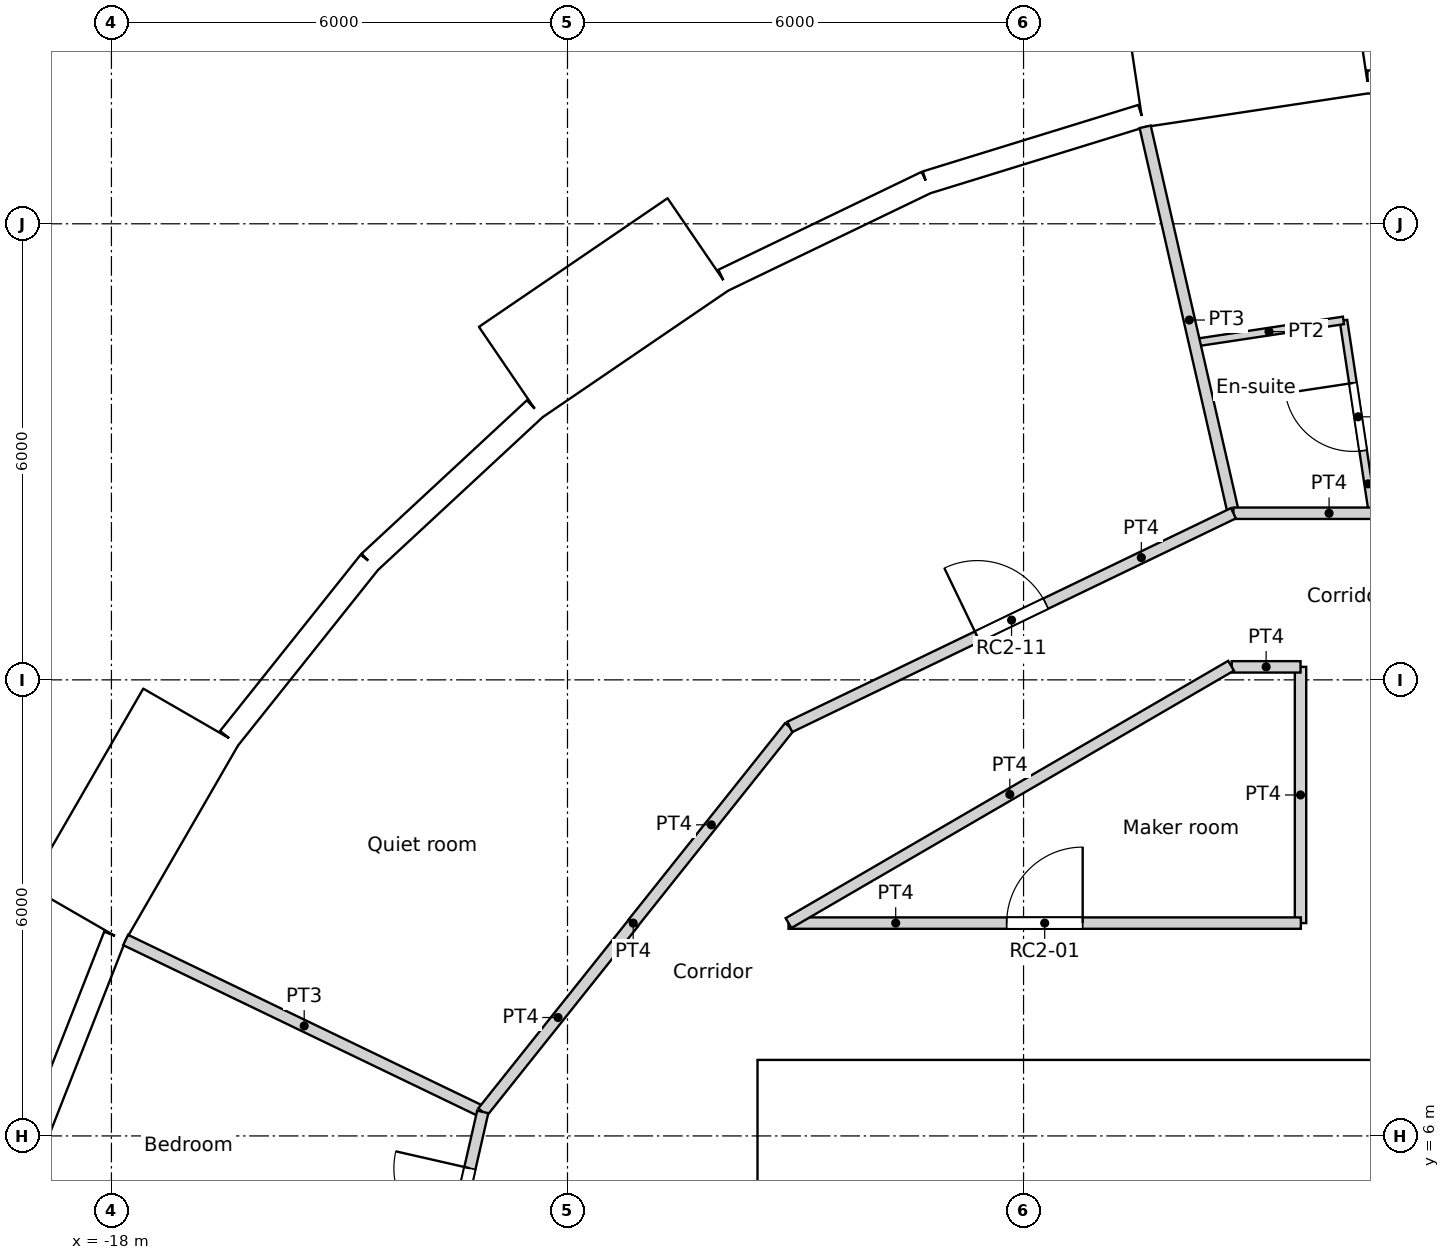
"""IFC4 building model, lengths in metres.
Left out: names, types, materials, properties, quantities, classifications, styles, units other than length and angle.
Written with IfcOpenShell. Run it as: python <this file> out.ifc"""

import sys

from ifc_helpers import new_model, si_unit, direction, frame, frame_2d, origin, origin_2d, place, context, subcontext, project, spatial, rectangle, circle, extrude, element, fill, save


model = new_model("IFC4")
c1 = context("Model", 3, precision=1e-05, world=origin(), true_north=direction((0.0, 1.0)))
c2 = subcontext(c1, "Body", "Model", "MODEL_VIEW")
j1 = project(units=[si_unit("LENGTHUNIT", "METRE"), si_unit("PLANEANGLEUNIT", "RADIAN")], contexts=[c1])
p1 = place(None, origin())
s1 = spatial("IfcSite", under=j1, at=p1, CompositionType="ELEMENT")
p2 = place(p1, origin())
s2 = spatial("IfcBuilding", under=s1, at=p2, CompositionType="ELEMENT")
p3 = place(p2, frame((0.0, 0.0, 241.8)))
s3 = spatial("IfcBuildingStorey", under=s2, at=p3, CompositionType="ELEMENT", Elevation=241.8)
for number, where, z_axis, x_axis in (
    (1, (-4.188, 18.35, 0.0), (0.0, 0.0, 1.0), (1.0, 0.0, 0.0)),
    (2, (-9.411, 16.301, 0.0), (0.0, 0.0, 1.0), (1.0, 0.0, 0.0)),
    (3, (-13.798, 12.802, 0.0), (0.0, 0.0, 1.0), (1.0, 0.0, 0.0)),
    (4, (-16.958, 8.167, 0.0), (0.0, 0.0, 1.0), (1.0, 0.0, 0.0)),
):
    element("IfcColumn", number, at=place(p3, frame(where, z_axis=z_axis, x_axis=x_axis)), inside=s3, PredefinedType="COLUMN", context=c2, shape_type="SweptSolid", body=[
        extrude(circle(Radius=0.55, at=origin_2d()), origin(), (0.0, 0.0, 1.0), 3.6),
    ])
p4 = place(p3, frame((1.489, 19.866, 0.0), z_axis=(0.0, 0.0, 1.0), x_axis=(-1.0, 0.0, 0.0)))
e5 = element("IfcWall", 5, at=p4, inside=s3, PredefinedType="SOLIDWALL", context=c2, shape_type="SweptSolid", body=[
    extrude(rectangle(XDim=2.962, YDim=0.3, at=frame_2d((1.481, 0.0))), origin(), (0.0, 0.0, 1.0), 3.25),
])
p5 = place(p4, frame((1.481, 0.0, 1.55)))
e6 = element("IfcOpeningElement", 6, at=p5, cuts=e5, PredefinedType="OPENING", context=c2, shape_type="SweptSolid", body=[
    extrude(circle(Radius=0.9, at=origin_2d()), frame((0.0, 0.16, 0.0), z_axis=(0.0, -1.0, 0.0), x_axis=(1.0, 0.0, 0.0)), (0.0, 0.0, 1.0), 0.32),
])
p6 = place(p3, frame((-1.563, 20.436, -0.35), z_axis=(0.0, 0.0, 1.0), x_axis=(-0.988836445254, -0.149004981587, 0.0)))
e7 = element("IfcWall", 7, at=p6, inside=s3, PredefinedType="ELEMENTEDWALL", context=c2, shape_type="SweptSolid", body=[
    extrude(rectangle(XDim=3.0, YDim=1.45, at=frame_2d((1.5, 0.0))), origin(), (0.0, 0.0, 1.0), 3.6),
])
p7 = place(p6, frame((1.5, 0.0, 1.9)))
e8 = element("IfcOpeningElement", 8, at=p7, cuts=e7, PredefinedType="OPENING", context=c2, shape_type="SweptSolid", body=[
    extrude(circle(Radius=0.9, at=origin_2d()), frame((0.0, 0.735, 0.0), z_axis=(0.0, -1.0, 0.0), x_axis=(1.0, 0.0, 0.0)), (0.0, 0.0, 1.0), 1.47),
])
p8 = place(p3, frame((-4.448, 19.418, 0.0), z_axis=(0.0, 0.0, 1.0), x_axis=(-0.95558635705, -0.294711238707, 0.0)))
e9 = element("IfcWall", 9, at=p8, inside=s3, PredefinedType="SOLIDWALL", context=c2, shape_type="SweptSolid", body=[
    extrude(rectangle(XDim=2.962, YDim=0.3, at=frame_2d((1.481, 0.0))), origin(), (0.0, 0.0, 1.0), 3.25),
])
p9 = place(p8, frame((1.481, 0.0, 1.55)))
e10 = element("IfcOpeningElement", 10, at=p9, cuts=e9, PredefinedType="OPENING", context=c2, shape_type="SweptSolid", body=[
    extrude(circle(Radius=0.9, at=origin_2d()), frame((0.0, 0.16, 0.0), z_axis=(0.0, -1.0, 0.0), x_axis=(1.0, 0.0, 0.0)), (0.0, 0.0, 1.0), 0.32),
])
p10 = place(p3, frame((-7.278, 18.545, 0.0), z_axis=(0.0, 0.0, 1.0), x_axis=(-0.900939615635, -0.433944476838, 0.0)))
e11 = element("IfcWall", 11, at=p10, inside=s3, PredefinedType="SOLIDWALL", context=c2, shape_type="SweptSolid", body=[
    extrude(rectangle(XDim=2.962, YDim=0.3, at=frame_2d((1.481, 0.0))), origin(), (0.0, 0.0, 1.0), 3.25),
])
p11 = place(p10, frame((1.481, 0.0, 1.55)))
e12 = element("IfcOpeningElement", 12, at=p11, cuts=e11, PredefinedType="OPENING", context=c2, shape_type="SweptSolid", body=[
    extrude(circle(Radius=0.9, at=origin_2d()), frame((0.0, 0.16, 0.0), z_axis=(0.0, -1.0, 0.0), x_axis=(1.0, 0.0, 0.0)), (0.0, 0.0, 1.0), 0.32),
])
p12 = place(p3, frame((-10.275, 17.734, -0.35), z_axis=(0.0, 0.0, 1.0), x_axis=(-0.826246281157, -0.563309047392, 0.0)))
e13 = element("IfcWall", 13, at=p12, inside=s3, PredefinedType="ELEMENTEDWALL", context=c2, shape_type="SweptSolid", body=[
    extrude(rectangle(XDim=3.0, YDim=1.45, at=frame_2d((1.5, 0.0))), origin(), (0.0, 0.0, 1.0), 3.6),
])
p13 = place(p12, frame((1.5, 0.0, 1.9)))
e14 = element("IfcOpeningElement", 14, at=p13, cuts=e13, PredefinedType="OPENING", context=c2, shape_type="SweptSolid", body=[
    extrude(circle(Radius=0.9, at=origin_2d()), frame((0.0, 0.735, 0.0), z_axis=(0.0, -1.0, 0.0), x_axis=(1.0, 0.0, 0.0)), (0.0, 0.0, 1.0), 1.47),
])
p14 = place(p3, frame((-12.432, 15.565, 0.0), z_axis=(0.0, 0.0, 1.0), x_axis=(-0.733066412643, -0.680157066165, 0.0)))
e15 = element("IfcWall", 15, at=p14, inside=s3, PredefinedType="SOLIDWALL", context=c2, shape_type="SweptSolid", body=[
    extrude(rectangle(XDim=2.962, YDim=0.3, at=frame_2d((1.481, 0.0))), origin(), (0.0, 0.0, 1.0), 3.25),
])
p15 = place(p14, frame((1.481, 0.0, 1.55)))
e16 = element("IfcOpeningElement", 16, at=p15, cuts=e15, PredefinedType="OPENING", context=c2, shape_type="SweptSolid", body=[
    extrude(circle(Radius=0.9, at=origin_2d()), frame((0.0, 0.16, 0.0), z_axis=(0.0, -1.0, 0.0), x_axis=(1.0, 0.0, 0.0)), (0.0, 0.0, 1.0), 0.32),
])
p16 = place(p3, frame((-14.604, 13.55, 0.0), z_axis=(0.0, 0.0, 1.0), x_axis=(-0.623498236992, -0.781824755599, 0.0)))
e17 = element("IfcWall", 17, at=p16, inside=s3, PredefinedType="SOLIDWALL", context=c2, shape_type="SweptSolid", body=[
    extrude(rectangle(XDim=2.962, YDim=0.3, at=frame_2d((1.481, 0.0))), origin(), (0.0, 0.0, 1.0), 3.25),
])
p17 = place(p16, frame((1.481, 0.0, 1.55)))
e18 = element("IfcOpeningElement", 18, at=p17, cuts=e17, PredefinedType="OPENING", context=c2, shape_type="SweptSolid", body=[
    extrude(circle(Radius=0.9, at=origin_2d()), frame((0.0, 0.16, 0.0), z_axis=(0.0, -1.0, 0.0), x_axis=(1.0, 0.0, 0.0)), (0.0, 0.0, 1.0), 0.32),
])
p18 = place(p3, frame((-16.952, 11.52, -0.35), z_axis=(0.0, 0.0, 1.0), x_axis=(-0.499990139034, -0.866031096941, 0.0)))
e19 = element("IfcWall", 19, at=p18, inside=s3, PredefinedType="ELEMENTEDWALL", context=c2, shape_type="SweptSolid", body=[
    extrude(rectangle(XDim=3.0, YDim=1.45, at=frame_2d((1.5, 0.0))), origin(), (0.0, 0.0, 1.0), 3.6),
])
p19 = place(p18, frame((1.5, 0.0, 1.9)))
e20 = element("IfcOpeningElement", 20, at=p19, cuts=e19, PredefinedType="OPENING", context=c2, shape_type="SweptSolid", body=[
    extrude(circle(Radius=0.9, at=origin_2d()), frame((0.0, 0.735, 0.0), z_axis=(0.0, -1.0, 0.0), x_axis=(1.0, 0.0, 0.0)), (0.0, 0.0, 1.0), 1.47),
])
p20 = place(p3, frame((-17.955, 8.629, 0.0), z_axis=(0.0, 0.0, 1.0), x_axis=(-0.36530043032, -0.930889679612, 0.0)))
e21 = element("IfcWall", 21, at=p20, inside=s3, PredefinedType="SOLIDWALL", context=c2, shape_type="SweptSolid", body=[
    extrude(rectangle(XDim=2.962, YDim=0.3, at=frame_2d((1.481, 0.0))), origin(), (0.0, 0.0, 1.0), 3.25),
])
p21 = place(p20, frame((1.481, 0.0, 1.55)))
e22 = element("IfcOpeningElement", 22, at=p21, cuts=e21, PredefinedType="OPENING", context=c2, shape_type="SweptSolid", body=[
    extrude(circle(Radius=0.9, at=origin_2d()), frame((0.0, 0.16, 0.0), z_axis=(0.0, -1.0, 0.0), x_axis=(1.0, 0.0, 0.0)), (0.0, 0.0, 1.0), 0.32),
])
p22 = place(p3, frame((-9.5, 6.7, 0.0), z_axis=(0.0, 0.0, 1.0), x_axis=(1.0, 0.0, 0.0)))
e23 = element("IfcWall", 23, at=p22, inside=s3, PredefinedType="SOLIDWALL", context=c2, shape_type="SweptSolid", body=[
    extrude(rectangle(XDim=19.0, YDim=0.6, at=frame_2d((9.5, 0.0))), origin(), (0.0, 0.0, 1.0), 3.6),
])
p23 = place(p22, frame((5.35, 0.0, 0.0)))
e24 = element("IfcOpeningElement", 24, at=p23, cuts=e23, PredefinedType="OPENING", context=c2, shape_type="SweptSolid", body=[
    extrude(rectangle(XDim=1.7, YDim=2.1, at=frame_2d((0.85, 1.05))), frame((0.0, 0.3, 0.0), z_axis=(0.0, -1.0, 0.0), x_axis=(1.0, 0.0, 0.0)), (0.0, 0.0, 1.0), 0.6),
])
p24 = place(p3, frame((-9.2, -6.4, 0.0), z_axis=(0.0, 0.0, 1.0), x_axis=(0.0, 1.0, 0.0)))
e25 = element("IfcWall", 25, at=p24, inside=s3, PredefinedType="SOLIDWALL", context=c2, shape_type="SweptSolid", body=[
    extrude(rectangle(XDim=12.8, YDim=0.6, at=frame_2d((6.4, 0.0))), origin(), (0.0, 0.0, 1.0), 3.6),
])
p25 = place(p3, frame((-2.25, 3.25, 0.0), z_axis=(0.0, 0.0, 1.0), x_axis=(0.0, 1.0, 0.0)))
e26 = element("IfcWall", 26, at=p25, inside=s3, PredefinedType="SOLIDWALL", context=c2, shape_type="SweptSolid", body=[
    extrude(rectangle(XDim=3.15, YDim=0.3, at=frame_2d((1.575, 0.0))), origin(), (0.0, 0.0, 1.0), 3.25),
])
p26 = place(p3, frame((-9.092, 8.8, 0.0), z_axis=(0.0, 0.0, 1.0), x_axis=(0.864470922103, 0.502682827277, 0.0)))
e27 = element("IfcWall", 27, at=p26, inside=s3, PredefinedType="PARTITIONING", context=c2, shape_type="SweptSolid", body=[
    extrude(rectangle(XDim=6.735, YDim=0.15, at=frame_2d((3.368, 0.0))), origin(), (0.0, 0.0, 1.0), 3.25),
])
p27 = place(p3, frame((-9.092, 8.8, 0.0), z_axis=(0.0, 0.0, 1.0), x_axis=(1.0, 0.0, 0.0)))
e28 = element("IfcWall", 28, at=p27, inside=s3, PredefinedType="PARTITIONING", context=c2, shape_type="SweptSolid", body=[
    extrude(rectangle(XDim=6.74, YDim=0.15, at=frame_2d((3.37, 0.0))), origin(), (0.0, 0.0, 1.0), 3.25),
])
p28 = place(p27, frame((2.87, 0.0, 0.0)))
e29 = element("IfcOpeningElement", 29, at=p28, cuts=e28, PredefinedType="OPENING", context=c2, shape_type="SweptSolid", body=[
    extrude(rectangle(XDim=1.0, YDim=2.04, at=frame_2d((0.5, 1.02))), frame((0.0, 0.075, 0.0), z_axis=(0.0, -1.0, 0.0), x_axis=(1.0, 0.0, 0.0)), (0.0, 0.0, 1.0), 0.15),
])
p29 = place(p3, frame((-11.134, 8.8, 0.0), z_axis=(0.0, 0.0, 1.0), x_axis=(-1.0, 0.0, 0.0)))
e30 = element("IfcWall", 30, at=p29, inside=s3, PredefinedType="PARTITIONING", context=c2, shape_type="SweptSolid", body=[
    extrude(rectangle(XDim=0.003, YDim=0.15, at=frame_2d((0.001, 0.0))), origin(), (0.0, 0.0, 1.0), 3.25),
])
p30 = place(p3, frame((-11.136, 8.802, 0.0), z_axis=(0.0, 0.0, 1.0), x_axis=(0.623151397235, 0.782101231379, 0.0)))
e31 = element("IfcWall", 31, at=p30, inside=s3, PredefinedType="PARTITIONING", context=c2, shape_type="SweptSolid", body=[
    extrude(rectangle(XDim=3.301, YDim=0.15, at=frame_2d((1.65, 0.0))), origin(), (0.0, 0.0, 1.0), 3.25),
])
p31 = place(p3, frame((-2.356, 8.8, 0.0), z_axis=(0.0, 0.0, 1.0), x_axis=(0.0, 1.0, 0.0)))
e32 = element("IfcWall", 32, at=p31, inside=s3, PredefinedType="PARTITIONING", context=c2, shape_type="SweptSolid", body=[
    extrude(rectangle(XDim=3.371, YDim=0.15, at=frame_2d((1.686, 0.0))), origin(), (0.0, 0.0, 1.0), 3.25),
])
p32 = place(p3, frame((-3.261, 12.171, 0.0), z_axis=(0.0, 0.0, 1.0), x_axis=(1.0, 0.0, 0.0)))
e33 = element("IfcWall", 33, at=p32, inside=s3, PredefinedType="PARTITIONING", context=c2, shape_type="SweptSolid", body=[
    extrude(rectangle(XDim=0.905, YDim=0.15, at=frame_2d((0.453, 0.0))), origin(), (0.0, 0.0, 1.0), 3.25),
])
p33 = place(p3, frame((-3.239, 14.192, 0.0), z_axis=(0.0, 0.0, 1.0), x_axis=(1.0, 0.0, 0.0)))
e34 = element("IfcWall", 34, at=p33, inside=s3, PredefinedType="PARTITIONING", context=c2, shape_type="SweptSolid", body=[
    extrude(rectangle(XDim=6.478, YDim=0.15, at=frame_2d((3.239, 0.0))), origin(), (0.0, 0.0, 1.0), 3.25),
])
p34 = place(p33, frame((4.888, 0.0, 0.0)))
e35 = element("IfcOpeningElement", 35, at=p34, cuts=e34, PredefinedType="OPENING", context=c2, shape_type="SweptSolid", body=[
    extrude(rectangle(XDim=1.0, YDim=2.1, at=frame_2d((0.5, 1.05))), frame((0.0, 0.075, 0.0), z_axis=(0.0, -1.0, 0.0), x_axis=(1.0, 0.0, 0.0)), (0.0, 0.0, 1.0), 0.15),
])
p35 = place(p33, frame((2.567, 0.0, 0.0)))
e36 = element("IfcOpeningElement", 36, at=p35, cuts=e34, PredefinedType="OPENING", context=c2, shape_type="SweptSolid", body=[
    extrude(rectangle(XDim=1.0, YDim=2.1, at=frame_2d((0.5, 1.05))), frame((0.0, 0.075, 0.0), z_axis=(0.0, -1.0, 0.0), x_axis=(1.0, 0.0, 0.0)), (0.0, 0.0, 1.0), 0.15),
])
p36 = place(p3, frame((-9.076, 11.381, 0.0), z_axis=(0.0, 0.0, 1.0), x_axis=(0.900976027191, 0.433868872388, 0.0)))
e37 = element("IfcWall", 37, at=p36, inside=s3, PredefinedType="PARTITIONING", context=c2, shape_type="SweptSolid", body=[
    extrude(rectangle(XDim=6.479, YDim=0.15, at=frame_2d((3.239, 0.0))), origin(), (0.0, 0.0, 1.0), 3.25),
])
p37 = place(p36, frame((2.739, 0.0, 0.0)))
e38 = element("IfcOpeningElement", 38, at=p37, cuts=e37, PredefinedType="OPENING", context=c2, shape_type="SweptSolid", body=[
    extrude(rectangle(XDim=1.0, YDim=2.04, at=frame_2d((0.5, 1.02))), frame((0.0, 0.075, 0.0), z_axis=(0.0, -1.0, 0.0), x_axis=(1.0, 0.0, 0.0)), (0.0, 0.0, 1.0), 0.15),
])
p38 = place(p3, frame((-13.115, 6.316, 0.0), z_axis=(0.0, 0.0, 1.0), x_axis=(0.623476099415, 0.781842409606, 0.0)))
e39 = element("IfcWall", 39, at=p38, inside=s3, PredefinedType="PARTITIONING", context=c2, shape_type="SweptSolid", body=[
    extrude(rectangle(XDim=3.177, YDim=0.15, at=frame_2d((1.589, 0.0))), origin(), (0.0, 0.0, 1.0), 3.25),
])
p39 = place(p3, frame((-14.557, 0.0, 0.0), z_axis=(0.0, 0.0, 1.0), x_axis=(0.222533159771, 0.974925121639, 0.0)))
e40 = element("IfcWall", 40, at=p39, inside=s3, PredefinedType="PARTITIONING", context=c2, shape_type="SweptSolid", body=[
    extrude(rectangle(XDim=6.478, YDim=0.15, at=frame_2d((3.239, 0.0))), origin(), (0.0, 0.0, 1.0), 3.25),
])
p40 = place(p39, frame((4.718, 0.0, 0.0)))
e41 = element("IfcOpeningElement", 41, at=p40, cuts=e40, PredefinedType="OPENING", context=c2, shape_type="SweptSolid", body=[
    extrude(rectangle(XDim=1.0, YDim=2.1, at=frame_2d((0.5, 1.05))), frame((0.0, 0.075, 0.0), z_axis=(0.0, -1.0, 0.0), x_axis=(1.0, 0.0, 0.0)), (0.0, 0.0, 1.0), 0.15),
])
p41 = place(p3, frame((-1.791, 16.729, 0.0), z_axis=(0.0, 0.0, 1.0), x_axis=(0.149289553133, -0.988793522089, 0.0)))
e42 = element("IfcWall", 42, at=p41, inside=s3, PredefinedType="PARTITIONING", context=c2, shape_type="SweptSolid", body=[
    extrude(rectangle(XDim=2.566, YDim=0.1, at=frame_2d((1.283, 0.0))), origin(), (0.0, 0.0, 1.0), 3.25),
])
p42 = place(p41, frame((0.833, 0.0, 0.0)))
e43 = element("IfcOpeningElement", 43, at=p42, cuts=e42, PredefinedType="OPENING", context=c2, shape_type="SweptSolid", body=[
    extrude(rectangle(XDim=0.9, YDim=2.04, at=frame_2d((0.45, 1.02))), frame((0.0, 0.05, 0.0), z_axis=(0.0, -1.0, 0.0), x_axis=(1.0, 0.0, 0.0)), (0.0, 0.0, 1.0), 0.1),
])
p43 = place(p3, frame((-3.751, 16.434, 0.0), z_axis=(0.0, 0.0, 1.0), x_axis=(0.988867580828, 0.148798210967, 0.0)))
e44 = element("IfcWall", 44, at=p43, inside=s3, PredefinedType="PARTITIONING", context=c2, shape_type="SweptSolid", body=[
    extrude(rectangle(XDim=1.982, YDim=0.1, at=frame_2d((0.991, 0.0))), origin(), (0.0, 0.0, 1.0), 3.25),
])
p44 = place(p3, frame((-4.4, 19.276, 0.0), z_axis=(0.0, 0.0, 1.0), x_axis=(0.222612505682, -0.974907007008, 0.0)))
e45 = element("IfcWall", 45, at=p44, inside=s3, PredefinedType="PARTITIONING", context=c2, shape_type="SweptSolid", body=[
    extrude(rectangle(XDim=5.215, YDim=0.15, at=frame_2d((2.607, 0.0))), origin(), (0.0, 0.0, 1.0), 3.25),
])
p45 = place(p3, frame((-17.813, 8.578, 0.0), z_axis=(0.0, 0.0, 1.0), x_axis=(0.901004381064, -0.433809987557, 0.0)))
e46 = element("IfcWall", 46, at=p45, inside=s3, PredefinedType="PARTITIONING", context=c2, shape_type="SweptSolid", body=[
    extrude(rectangle(XDim=5.214, YDim=0.15, at=frame_2d((2.607, 0.0))), origin(), (0.0, 0.0, 1.0), 3.25),
])
p46 = place(p7, origin())
e47 = element("IfcWindow", 47, at=p46, inside=s3, PartitioningType="SINGLE_PANEL", PredefinedType="WINDOW", context=c2, shape_type="SweptSolid", body=[
    extrude(circle(Radius=0.9, at=origin_2d()), frame((0.0, 0.695, 0.0), z_axis=(0.0, -1.0, 0.0), x_axis=(1.0, 0.0, 0.0)), (0.0, 0.0, 1.0), 0.1),
])
fill(e8, e47)
p47 = place(p9, origin())
e48 = element("IfcWindow", 48, at=p47, inside=s3, PartitioningType="SINGLE_PANEL", PredefinedType="WINDOW", context=c2, shape_type="SweptSolid", body=[
    extrude(circle(Radius=0.9, at=origin_2d()), frame((0.0, 0.12, 0.0), z_axis=(0.0, -1.0, 0.0), x_axis=(1.0, 0.0, 0.0)), (0.0, 0.0, 1.0), 0.1),
])
fill(e10, e48)
p48 = place(p11, origin())
e49 = element("IfcWindow", 49, at=p48, inside=s3, PartitioningType="SINGLE_PANEL", PredefinedType="WINDOW", context=c2, shape_type="SweptSolid", body=[
    extrude(circle(Radius=0.9, at=origin_2d()), frame((0.0, 0.12, 0.0), z_axis=(0.0, -1.0, 0.0), x_axis=(1.0, 0.0, 0.0)), (0.0, 0.0, 1.0), 0.1),
])
fill(e12, e49)
p49 = place(p13, origin())
e50 = element("IfcWindow", 50, at=p49, inside=s3, PartitioningType="SINGLE_PANEL", PredefinedType="WINDOW", context=c2, shape_type="SweptSolid", body=[
    extrude(circle(Radius=0.9, at=origin_2d()), frame((0.0, 0.695, 0.0), z_axis=(0.0, -1.0, 0.0), x_axis=(1.0, 0.0, 0.0)), (0.0, 0.0, 1.0), 0.1),
])
fill(e14, e50)
p50 = place(p15, origin())
e51 = element("IfcWindow", 51, at=p50, inside=s3, PartitioningType="SINGLE_PANEL", PredefinedType="WINDOW", context=c2, shape_type="SweptSolid", body=[
    extrude(circle(Radius=0.9, at=origin_2d()), frame((0.0, 0.12, 0.0), z_axis=(0.0, -1.0, 0.0), x_axis=(1.0, 0.0, 0.0)), (0.0, 0.0, 1.0), 0.1),
])
fill(e16, e51)
p51 = place(p17, origin())
e52 = element("IfcWindow", 52, at=p51, inside=s3, PartitioningType="SINGLE_PANEL", PredefinedType="WINDOW", context=c2, shape_type="SweptSolid", body=[
    extrude(circle(Radius=0.9, at=origin_2d()), frame((0.0, 0.12, 0.0), z_axis=(0.0, -1.0, 0.0), x_axis=(1.0, 0.0, 0.0)), (0.0, 0.0, 1.0), 0.1),
])
fill(e18, e52)
p52 = place(p19, origin())
e53 = element("IfcWindow", 53, at=p52, inside=s3, PartitioningType="SINGLE_PANEL", PredefinedType="WINDOW", context=c2, shape_type="SweptSolid", body=[
    extrude(circle(Radius=0.9, at=origin_2d()), frame((0.0, 0.695, 0.0), z_axis=(0.0, -1.0, 0.0), x_axis=(1.0, 0.0, 0.0)), (0.0, 0.0, 1.0), 0.1),
])
fill(e20, e53)
p53 = place(p21, origin())
e54 = element("IfcWindow", 54, at=p53, inside=s3, PartitioningType="SINGLE_PANEL", PredefinedType="WINDOW", context=c2, shape_type="SweptSolid", body=[
    extrude(circle(Radius=0.9, at=origin_2d()), frame((0.0, 0.12, 0.0), z_axis=(0.0, -1.0, 0.0), x_axis=(1.0, 0.0, 0.0)), (0.0, 0.0, 1.0), 0.1),
])
fill(e22, e54)
p54 = place(p23, origin())
e55 = element("IfcDoor", 55, at=p54, inside=s3, OperationType="DOUBLE_DOOR_SINGLE_SWING", PredefinedType="DOOR", context=c2, shape_type="SweptSolid", body=[
    extrude(rectangle(XDim=1.7, YDim=2.1, at=frame_2d((0.85, 1.05))), frame((0.0, 0.025, 0.0), z_axis=(0.0, -1.0, 0.0), x_axis=(1.0, 0.0, 0.0)), (0.0, 0.0, 1.0), 0.05),
])
fill(e24, e55)
p55 = place(p28, origin())
e56 = element("IfcDoor", 56, at=p55, inside=s3, OperationType="SINGLE_SWING_RIGHT", PredefinedType="DOOR", context=c2, shape_type="SweptSolid", body=[
    extrude(rectangle(XDim=1.0, YDim=2.04, at=frame_2d((0.5, 1.02))), frame((0.0, 0.025, 0.0), z_axis=(0.0, -1.0, 0.0), x_axis=(1.0, 0.0, 0.0)), (0.0, 0.0, 1.0), 0.05),
])
fill(e29, e56)
p56 = place(p42, origin())
e57 = element("IfcDoor", 57, at=p56, inside=s3, OperationType="SINGLE_SWING_RIGHT", PredefinedType="DOOR", context=c2, shape_type="SweptSolid", body=[
    extrude(rectangle(XDim=0.9, YDim=2.04, at=frame_2d((0.45, 1.02))), frame((0.0, 0.025, 0.0), z_axis=(0.0, -1.0, 0.0), x_axis=(1.0, 0.0, 0.0)), (0.0, 0.0, 1.0), 0.05),
])
fill(e43, e57)
p57 = place(p37, origin())
e58 = element("IfcDoor", 58, at=p57, inside=s3, OperationType="SINGLE_SWING_LEFT", PredefinedType="DOOR", context=c2, shape_type="SweptSolid", body=[
    extrude(rectangle(XDim=1.0, YDim=2.04, at=frame_2d((0.5, 1.02))), frame((0.0, 0.025, 0.0), z_axis=(0.0, -1.0, 0.0), x_axis=(1.0, 0.0, 0.0)), (0.0, 0.0, 1.0), 0.05),
])
fill(e38, e58)
p58 = place(p40, origin())
e59 = element("IfcDoor", 59, at=p58, inside=s3, OperationType="SINGLE_SWING_RIGHT", PredefinedType="DOOR", context=c2, shape_type="SweptSolid", body=[
    extrude(rectangle(XDim=1.0, YDim=2.1, at=frame_2d((0.5, 1.05))), frame((0.0, 0.025, 0.0), z_axis=(0.0, -1.0, 0.0), x_axis=(1.0, 0.0, 0.0)), (0.0, 0.0, 1.0), 0.05),
])
fill(e41, e59)
save(model, sys.argv[1])
